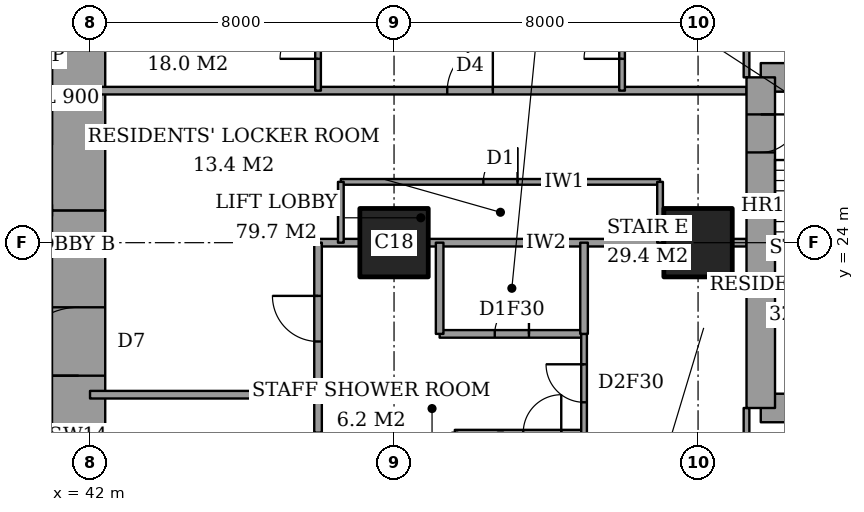
"""IFC4 building model, lengths in metres.
Left out: names, types, materials, properties, quantities, classifications, styles, units other than length and angle.
Written with IfcOpenShell. Run it as: python <this file> out.ifc"""

import sys

from ifc_helpers import new_model, si_unit, direction, frame, frame_2d, origin, origin_2d, place, context, subcontext, project, spatial, rectangle, extrude, element, fill, save


model = new_model("IFC4")
c1 = context("Model", 3, precision=1e-05, world=origin(), true_north=direction((0.0, 1.0)))
c2 = subcontext(c1, "Body", "Model", "MODEL_VIEW")
j1 = project(units=[si_unit("LENGTHUNIT", "METRE"), si_unit("PLANEANGLEUNIT", "RADIAN")], contexts=[c1])
p1 = place(None, origin())
s1 = spatial("IfcSite", under=j1, at=p1, CompositionType="ELEMENT")
p2 = place(p1, origin())
s2 = spatial("IfcBuilding", under=s1, at=p2, CompositionType="ELEMENT")
p3 = place(p2, frame((0.0, 0.0, 196.6)))
s3 = spatial("IfcBuildingStorey", under=s2, at=p3, CompositionType="ELEMENT", Elevation=196.6)
for number, where, z_axis, x_axis in (
    (1, (50.0, 24.0, 0.0), (0.0, 0.0, 1.0), (1.0, 0.0, 0.0)),
    (2, (58.0, 24.0, 0.0), (0.0, 0.0, 1.0), (1.0, 0.0, 0.0)),
):
    element("IfcColumn", number, at=place(p3, frame(where, z_axis=z_axis, x_axis=x_axis)), inside=s3, PredefinedType="COLUMN", context=c2, shape_type="SweptSolid", body=[
        extrude(rectangle(XDim=1.8, YDim=1.8, at=origin_2d()), origin(), (0.0, 0.0, 1.0), 3.6),
    ])
p4 = place(p3, frame((41.7, 13.0, 0.0), z_axis=(0.0, 0.0, 1.0), x_axis=(0.0, 1.0, 0.0)))
e3 = element("IfcWall", 3, at=p4, inside=s3, PredefinedType="SHEAR", context=c2, shape_type="SweptSolid", body=[
    extrude(rectangle(XDim=11.85, YDim=1.4, at=frame_2d((5.925, 0.0))), origin(), (0.0, 0.0, 1.0), 3.6),
])
p5 = place(p4, frame((7.5, 0.0, 0.0)))
e4 = element("IfcOpeningElement", 4, at=p5, cuts=e3, PredefinedType="OPENING", context=c2, shape_type="SweptSolid", body=[
    extrude(rectangle(XDim=1.8, YDim=2.4, at=frame_2d((0.9, 1.2))), frame((0.0, 0.71, 0.0), z_axis=(0.0, -1.0, 0.0), x_axis=(1.0, 0.0, 0.0)), (0.0, 0.0, 1.0), 1.42),
])
p6 = place(p3, frame((41.7, 24.85, 0.0), z_axis=(0.0, 0.0, 1.0), x_axis=(0.0, 1.0, 0.0)))
e5 = element("IfcWall", 5, at=p6, inside=s3, PredefinedType="SHEAR", context=c2, shape_type="SweptSolid", body=[
    extrude(rectangle(XDim=10.15, YDim=1.4, at=frame_2d((5.075, 0.0))), origin(), (0.0, 0.0, 1.0), 3.6),
])
for number, where, z_axis, x_axis in (
    (6, (59.65, 19.65, 0.0), (0.0, 0.0, 1.0), (1.0, 0.0, 0.0)),
    (7, (64.1, 28.35, 0.0), (0.0, 0.0, 1.0), (-1.0, 0.0, 0.0)),
):
    element("IfcWall", number, at=place(p3, frame(where, z_axis=z_axis, x_axis=x_axis)), inside=s3, PredefinedType="SHEAR", context=c2, shape_type="SweptSolid", body=[
        extrude(rectangle(XDim=4.45, YDim=0.75, at=frame_2d((2.225, 0.0))), origin(), (0.0, 0.0, 1.0), 3.6),
    ])
p7 = place(p3, frame((59.65, 28.35, 0.0), z_axis=(0.0, 0.0, 1.0), x_axis=(0.0, -1.0, 0.0)))
e8 = element("IfcWall", 8, at=p7, inside=s3, PredefinedType="SHEAR", context=c2, shape_type="SweptSolid", body=[
    extrude(rectangle(XDim=8.7, YDim=0.75, at=frame_2d((4.35, 0.0))), origin(), (0.0, 0.0, 1.0), 3.6),
])
p8 = place(p7, frame((0.975, 0.0, 0.0)))
e9 = element("IfcOpeningElement", 9, at=p8, cuts=e8, PredefinedType="OPENING", context=c2, shape_type="SweptSolid", body=[
    extrude(rectangle(XDim=1.0, YDim=2.1, at=frame_2d((0.5, 1.05))), frame((0.0, 0.385, 0.0), z_axis=(0.0, -1.0, 0.0), x_axis=(1.0, 0.0, 0.0)), (0.0, 0.0, 1.0), 0.77),
])
p9 = place(p3, frame((51.6, 19.0, 0.0), z_axis=(0.0, 0.0, 1.0), x_axis=(1.0, 0.0, 0.0)))
e10 = element("IfcWall", 10, at=p9, inside=s3, PredefinedType="PARTITIONING", context=c2, shape_type="SweptSolid", body=[
    extrude(rectangle(XDim=3.4, YDim=0.15, at=frame_2d((1.7, 0.0))), origin(), (0.0, 0.0, 1.0), 3.35),
])
p10 = place(p9, frame((1.8, 0.0, 0.0)))
e11 = element("IfcOpeningElement", 11, at=p10, cuts=e10, PredefinedType="OPENING", context=c2, shape_type="SweptSolid", body=[
    extrude(rectangle(XDim=1.0, YDim=2.1, at=frame_2d((0.5, 1.05))), frame((0.0, 0.085, 0.0), z_axis=(0.0, -1.0, 0.0), x_axis=(1.0, 0.0, 0.0)), (0.0, 0.0, 1.0), 0.17),
])
p11 = place(p3, frame((42.0, 20.0, 0.0), z_axis=(0.0, 0.0, 1.0), x_axis=(1.0, 0.0, 0.0)))
e12 = element("IfcWall", 12, at=p11, inside=s3, PredefinedType="PARTITIONING", context=c2, shape_type="SweptSolid", body=[
    extrude(rectangle(XDim=6.0, YDim=0.2, at=frame_2d((3.0, 0.0))), origin(), (0.0, 0.0, 1.0), 3.35),
])
p12 = place(p3, frame((51.2, 21.6, 0.0), z_axis=(0.0, 0.0, 1.0), x_axis=(1.0, 0.0, 0.0)))
e13 = element("IfcWall", 13, at=p12, inside=s3, PredefinedType="PARTITIONING", context=c2, shape_type="SweptSolid", body=[
    extrude(rectangle(XDim=3.8, YDim=0.2, at=frame_2d((1.9, 0.0))), origin(), (0.0, 0.0, 1.0), 3.35),
])
p13 = place(p12, frame((1.45, 0.0, 0.0)))
e14 = element("IfcOpeningElement", 14, at=p13, cuts=e13, PredefinedType="OPENING", context=c2, shape_type="SweptSolid", body=[
    extrude(rectangle(XDim=0.9, YDim=2.1, at=frame_2d((0.45, 1.05))), frame((0.0, 0.11, 0.0), z_axis=(0.0, -1.0, 0.0), x_axis=(1.0, 0.0, 0.0)), (0.0, 0.0, 1.0), 0.22),
])
p14 = place(p3, frame((48.0, 24.0, 0.0), z_axis=(0.0, 0.0, 1.0), x_axis=(1.0, 0.0, 0.0)))
e15 = element("IfcWall", 15, at=p14, inside=s3, PredefinedType="PARTITIONING", context=c2, shape_type="SweptSolid", body=[
    extrude(rectangle(XDim=1.1, YDim=0.2, at=frame_2d((0.55, 0.0))), origin(), (0.0, 0.0, 1.0), 3.35),
])
p15 = place(p3, frame((50.9, 24.0, 0.0), z_axis=(0.0, 0.0, 1.0), x_axis=(1.0, 0.0, 0.0)))
e16 = element("IfcWall", 16, at=p15, inside=s3, PredefinedType="PARTITIONING", context=c2, shape_type="SweptSolid", body=[
    extrude(rectangle(XDim=6.2, YDim=0.2, at=frame_2d((3.1, 0.0))), origin(), (0.0, 0.0, 1.0), 3.35),
])
p16 = place(p3, frame((58.9, 24.0, 0.0), z_axis=(0.0, 0.0, 1.0), x_axis=(1.0, 0.0, 0.0)))
e17 = element("IfcWall", 17, at=p16, inside=s3, PredefinedType="PARTITIONING", context=c2, shape_type="SweptSolid", body=[
    extrude(rectangle(XDim=0.375, YDim=0.2, at=frame_2d((0.188, 0.0))), origin(), (0.0, 0.0, 1.0), 3.35),
])
p17 = place(p3, frame((48.6, 25.6, 0.0), z_axis=(0.0, 0.0, 1.0), x_axis=(1.0, 0.0, 0.0)))
e18 = element("IfcWall", 18, at=p17, inside=s3, PredefinedType="PARTITIONING", context=c2, shape_type="SweptSolid", body=[
    extrude(rectangle(XDim=8.4, YDim=0.15, at=frame_2d((4.2, 0.0))), origin(), (0.0, 0.0, 1.0), 3.35),
])
p18 = place(p17, frame((3.75, 0.0, 0.0)))
e19 = element("IfcOpeningElement", 19, at=p18, cuts=e18, PredefinedType="OPENING", context=c2, shape_type="SweptSolid", body=[
    extrude(rectangle(XDim=0.9, YDim=2.1, at=frame_2d((0.45, 1.05))), frame((0.0, 0.085, 0.0), z_axis=(0.0, -1.0, 0.0), x_axis=(1.0, 0.0, 0.0)), (0.0, 0.0, 1.0), 0.17),
])
p19 = place(p3, frame((42.0, 28.0, 0.0), z_axis=(0.0, 0.0, 1.0), x_axis=(1.0, 0.0, 0.0)))
e20 = element("IfcWall", 20, at=p19, inside=s3, PredefinedType="PARTITIONING", context=c2, shape_type="SweptSolid", body=[
    extrude(rectangle(XDim=17.275, YDim=0.2, at=frame_2d((8.637, 0.0))), origin(), (0.0, 0.0, 1.0), 3.35),
])
p20 = place(p19, frame((9.4, 0.0, 0.0)))
e21 = element("IfcOpeningElement", 21, at=p20, cuts=e20, PredefinedType="OPENING", context=c2, shape_type="SweptSolid", body=[
    extrude(rectangle(XDim=1.2, YDim=2.4, at=frame_2d((0.6, 1.2))), frame((0.0, 0.11, 0.0), z_axis=(0.0, -1.0, 0.0), x_axis=(1.0, 0.0, 0.0)), (0.0, 0.0, 1.0), 0.22),
])
p21 = place(p3, frame((48.0, 19.0, 0.0), z_axis=(0.0, 0.0, 1.0), x_axis=(0.0, 1.0, 0.0)))
e22 = element("IfcWall", 22, at=p21, inside=s3, PredefinedType="PARTITIONING", context=c2, shape_type="SweptSolid", body=[
    extrude(rectangle(XDim=5.0, YDim=0.2, at=frame_2d((2.5, 0.0))), origin(), (0.0, 0.0, 1.0), 3.35),
])
p22 = place(p21, frame((2.4, 0.0, 0.0)))
e23 = element("IfcOpeningElement", 23, at=p22, cuts=e22, PredefinedType="OPENING", context=c2, shape_type="SweptSolid", body=[
    extrude(rectangle(XDim=1.2, YDim=2.4, at=frame_2d((0.6, 1.2))), frame((0.0, 0.11, 0.0), z_axis=(0.0, -1.0, 0.0), x_axis=(1.0, 0.0, 0.0)), (0.0, 0.0, 1.0), 0.22),
])
p23 = place(p3, frame((48.0, 28.0, 0.0), z_axis=(0.0, 0.0, 1.0), x_axis=(0.0, 1.0, 0.0)))
e24 = element("IfcWall", 24, at=p23, inside=s3, PredefinedType="PARTITIONING", context=c2, shape_type="SweptSolid", body=[
    extrude(rectangle(XDim=9.4, YDim=0.15, at=frame_2d((4.7, 0.0))), origin(), (0.0, 0.0, 1.0), 3.35),
])
p24 = place(p23, frame((0.837, 0.0, 0.0)))
e25 = element("IfcOpeningElement", 25, at=p24, cuts=e24, PredefinedType="OPENING", context=c2, shape_type="SweptSolid", body=[
    extrude(rectangle(XDim=1.0, YDim=2.1, at=frame_2d((0.5, 1.05))), frame((0.0, 0.085, 0.0), z_axis=(0.0, -1.0, 0.0), x_axis=(1.0, 0.0, 0.0)), (0.0, 0.0, 1.0), 0.17),
])
p25 = place(p3, frame((48.6, 24.0, 0.0), z_axis=(0.0, 0.0, 1.0), x_axis=(0.0, 1.0, 0.0)))
e26 = element("IfcWall", 26, at=p25, inside=s3, PredefinedType="PARTITIONING", context=c2, shape_type="SweptSolid", body=[
    extrude(rectangle(XDim=1.6, YDim=0.15, at=frame_2d((0.8, 0.0))), origin(), (0.0, 0.0, 1.0), 3.35),
])
p26 = place(p3, frame((51.2, 21.6, 0.0), z_axis=(0.0, 0.0, 1.0), x_axis=(0.0, 1.0, 0.0)))
e27 = element("IfcWall", 27, at=p26, inside=s3, PredefinedType="PARTITIONING", context=c2, shape_type="SweptSolid", body=[
    extrude(rectangle(XDim=2.4, YDim=0.2, at=frame_2d((1.2, 0.0))), origin(), (0.0, 0.0, 1.0), 3.35),
])
p27 = place(p3, frame((51.6, 16.05, 0.0), z_axis=(0.0, 0.0, 1.0), x_axis=(0.0, 1.0, 0.0)))
e28 = element("IfcWall", 28, at=p27, inside=s3, PredefinedType="PARTITIONING", context=c2, shape_type="SweptSolid", body=[
    extrude(rectangle(XDim=2.95, YDim=0.15, at=frame_2d((1.475, 0.0))), origin(), (0.0, 0.0, 1.0), 3.35),
])
p28 = place(p3, frame((55.0, 21.6, 0.0), z_axis=(0.0, 0.0, 1.0), x_axis=(0.0, 1.0, 0.0)))
e29 = element("IfcWall", 29, at=p28, inside=s3, PredefinedType="PARTITIONING", context=c2, shape_type="SweptSolid", body=[
    extrude(rectangle(XDim=2.4, YDim=0.2, at=frame_2d((1.2, 0.0))), origin(), (0.0, 0.0, 1.0), 3.35),
])
p29 = place(p3, frame((55.0, 10.6, 0.0), z_axis=(0.0, 0.0, 1.0), x_axis=(0.0, 1.0, 0.0)))
e30 = element("IfcWall", 30, at=p29, inside=s3, PredefinedType="PARTITIONING", context=c2, shape_type="SweptSolid", body=[
    extrude(rectangle(XDim=11.0, YDim=0.15, at=frame_2d((5.5, 0.0))), origin(), (0.0, 0.0, 1.0), 3.35),
])
p30 = place(p29, frame((9.2, 0.0, 0.0)))
e31 = element("IfcOpeningElement", 31, at=p30, cuts=e30, PredefinedType="OPENING", context=c2, shape_type="SweptSolid", body=[
    extrude(rectangle(XDim=1.0, YDim=2.1, at=frame_2d((0.5, 1.05))), frame((0.0, 0.085, 0.0), z_axis=(0.0, -1.0, 0.0), x_axis=(1.0, 0.0, 0.0)), (0.0, 0.0, 1.0), 0.17),
])
p31 = place(p3, frame((56.0, 28.0, 0.0), z_axis=(0.0, 0.0, 1.0), x_axis=(0.0, 1.0, 0.0)))
e32 = element("IfcWall", 32, at=p31, inside=s3, PredefinedType="PARTITIONING", context=c2, shape_type="SweptSolid", body=[
    extrude(rectangle(XDim=9.4, YDim=0.15, at=frame_2d((4.7, 0.0))), origin(), (0.0, 0.0, 1.0), 3.35),
])
p32 = place(p31, frame((0.837, 0.0, 0.0)))
e33 = element("IfcOpeningElement", 33, at=p32, cuts=e32, PredefinedType="OPENING", context=c2, shape_type="SweptSolid", body=[
    extrude(rectangle(XDim=1.0, YDim=2.1, at=frame_2d((0.5, 1.05))), frame((0.0, 0.085, 0.0), z_axis=(0.0, -1.0, 0.0), x_axis=(1.0, 0.0, 0.0)), (0.0, 0.0, 1.0), 0.17),
])
p33 = place(p3, frame((57.0, 24.0, 0.0), z_axis=(0.0, 0.0, 1.0), x_axis=(0.0, 1.0, 0.0)))
e34 = element("IfcWall", 34, at=p33, inside=s3, PredefinedType="PARTITIONING", context=c2, shape_type="SweptSolid", body=[
    extrude(rectangle(XDim=1.6, YDim=0.15, at=frame_2d((0.8, 0.0))), origin(), (0.0, 0.0, 1.0), 3.35),
])
p34 = place(p3, frame((59.275, 17.2, 0.0), z_axis=(0.0, 0.0, 1.0), x_axis=(0.0, 1.0, 0.0)))
e35 = element("IfcWall", 35, at=p34, inside=s3, PredefinedType="PARTITIONING", context=c2, shape_type="SweptSolid", body=[
    extrude(rectangle(XDim=2.45, YDim=0.15, at=frame_2d((1.225, 0.0))), origin(), (0.0, 0.0, 1.0), 3.35),
])
p35 = place(p34, frame((0.538, 0.0, 0.0)))
e36 = element("IfcOpeningElement", 36, at=p35, cuts=e35, PredefinedType="OPENING", context=c2, shape_type="SweptSolid", body=[
    extrude(rectangle(XDim=1.0, YDim=2.1, at=frame_2d((0.5, 1.05))), frame((0.0, 0.085, 0.0), z_axis=(0.0, -1.0, 0.0), x_axis=(1.0, 0.0, 0.0)), (0.0, 0.0, 1.0), 0.17),
])
p36 = place(p3, frame((59.275, 28.35, 0.0), z_axis=(0.0, 0.0, 1.0), x_axis=(0.0, 1.0, 0.0)))
e37 = element("IfcWall", 37, at=p36, inside=s3, PredefinedType="PARTITIONING", context=c2, shape_type="SweptSolid", body=[
    extrude(rectangle(XDim=2.45, YDim=0.15, at=frame_2d((1.225, 0.0))), origin(), (0.0, 0.0, 1.0), 3.35),
])
p37 = place(p36, frame((0.962, 0.0, 0.0)))
e38 = element("IfcOpeningElement", 38, at=p37, cuts=e37, PredefinedType="OPENING", context=c2, shape_type="SweptSolid", body=[
    extrude(rectangle(XDim=0.9, YDim=2.1, at=frame_2d((0.45, 1.05))), frame((0.0, 0.085, 0.0), z_axis=(0.0, -1.0, 0.0), x_axis=(1.0, 0.0, 0.0)), (0.0, 0.0, 1.0), 0.17),
])
p38 = place(p30, origin())
e39 = element("IfcDoor", 39, at=p38, inside=s3, OperationType="SINGLE_SWING_LEFT", PredefinedType="DOOR", context=c2, shape_type="SweptSolid", body=[
    extrude(rectangle(XDim=1.0, YDim=2.1, at=frame_2d((0.5, 1.05))), frame((0.0, 0.025, 0.0), z_axis=(0.0, -1.0, 0.0), x_axis=(1.0, 0.0, 0.0)), (0.0, 0.0, 1.0), 0.05),
])
fill(e31, e39)
p39 = place(p13, origin())
e40 = element("IfcDoor", 40, at=p39, inside=s3, OperationType="SINGLE_SWING_LEFT", PredefinedType="DOOR", context=c2, shape_type="SweptSolid", body=[
    extrude(rectangle(XDim=0.9, YDim=2.1, at=frame_2d((0.45, 1.05))), frame((0.0, 0.025, 0.0), z_axis=(0.0, -1.0, 0.0), x_axis=(1.0, 0.0, 0.0)), (0.0, 0.0, 1.0), 0.05),
])
fill(e14, e40)
p40 = place(p22, origin())
e41 = element("IfcDoor", 41, at=p40, inside=s3, OperationType="SINGLE_SWING_LEFT", PredefinedType="DOOR", context=c2, shape_type="SweptSolid", body=[
    extrude(rectangle(XDim=1.2, YDim=2.4, at=frame_2d((0.6, 1.2))), frame((0.0, 0.025, 0.0), z_axis=(0.0, -1.0, 0.0), x_axis=(1.0, 0.0, 0.0)), (0.0, 0.0, 1.0), 0.05),
])
fill(e23, e41)
p41 = place(p10, origin())
e42 = element("IfcDoor", 42, at=p41, inside=s3, OperationType="SINGLE_SWING_LEFT", PredefinedType="DOOR", context=c2, shape_type="SweptSolid", body=[
    extrude(rectangle(XDim=1.0, YDim=2.1, at=frame_2d((0.5, 1.05))), frame((0.0, 0.025, 0.0), z_axis=(0.0, -1.0, 0.0), x_axis=(1.0, 0.0, 0.0)), (0.0, 0.0, 1.0), 0.05),
])
fill(e11, e42)
p42 = place(p32, origin())
e43 = element("IfcDoor", 43, at=p42, inside=s3, OperationType="SINGLE_SWING_RIGHT", PredefinedType="DOOR", context=c2, shape_type="SweptSolid", body=[
    extrude(rectangle(XDim=1.0, YDim=2.1, at=frame_2d((0.5, 1.05))), frame((0.0, 0.025, 0.0), z_axis=(0.0, -1.0, 0.0), x_axis=(1.0, 0.0, 0.0)), (0.0, 0.0, 1.0), 0.05),
])
fill(e33, e43)
p43 = place(p20, origin())
e44 = element("IfcDoor", 44, at=p43, inside=s3, OperationType="SINGLE_SWING_LEFT", PredefinedType="DOOR", context=c2, shape_type="SweptSolid", body=[
    extrude(rectangle(XDim=1.2, YDim=2.4, at=frame_2d((0.6, 1.2))), frame((0.0, 0.025, 0.0), z_axis=(0.0, -1.0, 0.0), x_axis=(1.0, 0.0, 0.0)), (0.0, 0.0, 1.0), 0.05),
])
fill(e21, e44)
p44 = place(p24, origin())
e45 = element("IfcDoor", 45, at=p44, inside=s3, OperationType="SINGLE_SWING_RIGHT", PredefinedType="DOOR", context=c2, shape_type="SweptSolid", body=[
    extrude(rectangle(XDim=1.0, YDim=2.1, at=frame_2d((0.5, 1.05))), frame((0.0, 0.025, 0.0), z_axis=(0.0, -1.0, 0.0), x_axis=(1.0, 0.0, 0.0)), (0.0, 0.0, 1.0), 0.05),
])
fill(e25, e45)
p45 = place(p18, origin())
e46 = element("IfcDoor", 46, at=p45, inside=s3, OperationType="SINGLE_SWING_LEFT", PredefinedType="DOOR", context=c2, shape_type="SweptSolid", body=[
    extrude(rectangle(XDim=0.9, YDim=2.1, at=frame_2d((0.45, 1.05))), frame((0.0, 0.025, 0.0), z_axis=(0.0, -1.0, 0.0), x_axis=(1.0, 0.0, 0.0)), (0.0, 0.0, 1.0), 0.05),
])
fill(e19, e46)
p46 = place(p5, origin())
e47 = element("IfcDoor", 47, at=p46, inside=s3, OperationType="DOUBLE_DOOR_DOUBLE_SWING", PredefinedType="DOOR", context=c2, shape_type="SweptSolid", body=[
    extrude(rectangle(XDim=1.8, YDim=2.4, at=frame_2d((0.9, 1.2))), frame((0.0, 0.025, 0.0), z_axis=(0.0, -1.0, 0.0), x_axis=(1.0, 0.0, 0.0)), (0.0, 0.0, 1.0), 0.05),
])
fill(e4, e47)
p47 = place(p8, origin())
e48 = element("IfcDoor", 48, at=p47, inside=s3, OperationType="SINGLE_SWING_RIGHT", PredefinedType="DOOR", context=c2, shape_type="SweptSolid", body=[
    extrude(rectangle(XDim=1.0, YDim=2.1, at=frame_2d((0.5, 1.05))), frame((0.0, 0.025, 0.0), z_axis=(0.0, -1.0, 0.0), x_axis=(1.0, 0.0, 0.0)), (0.0, 0.0, 1.0), 0.05),
])
fill(e9, e48)
save(model, sys.argv[1])
